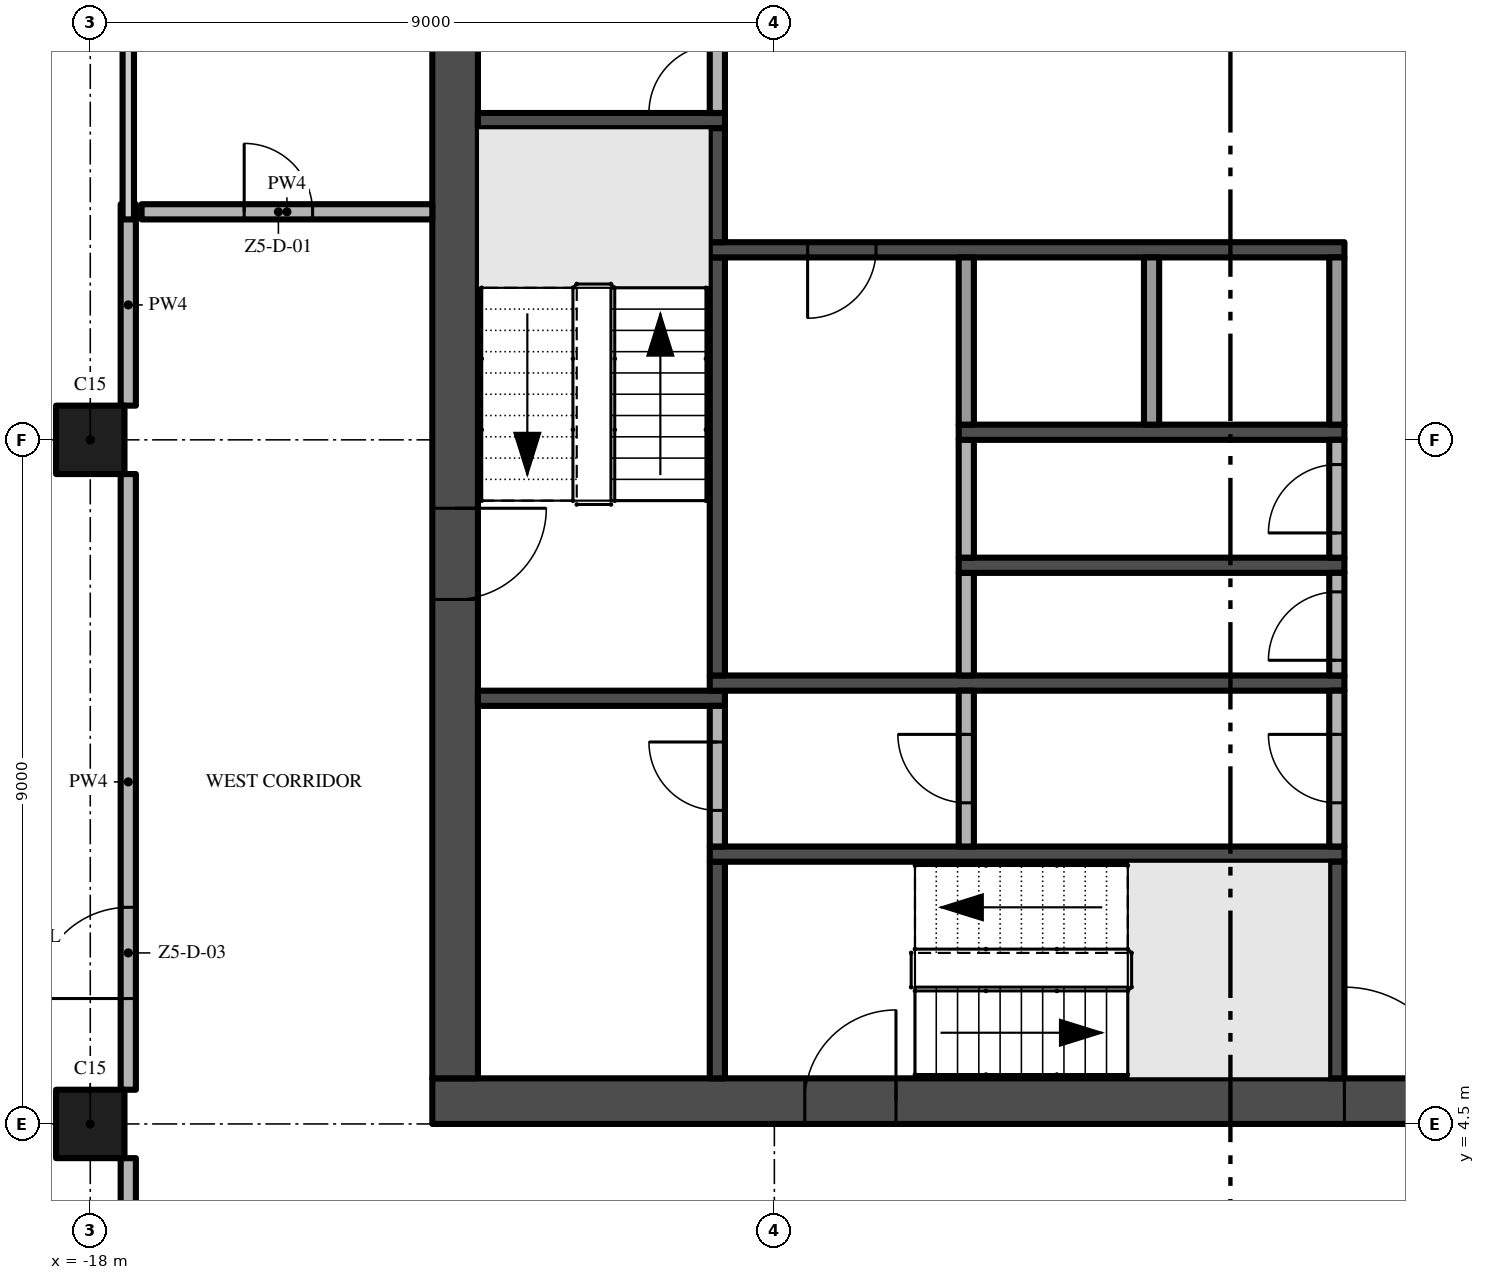
"""IFC4 building model, lengths in metres.
Left out: names, types, materials, properties, quantities, classifications, styles, units other than length and angle.
Written with IfcOpenShell. Run it as: python <this file> out.ifc"""

import sys

from ifc_helpers import new_model, si_unit, direction, frame, frame_2d, origin, origin_2d, place, context, subcontext, project, spatial, rectangle, extrude, element, fill, save


model = new_model("IFC4")
c1 = context("Model", 3, precision=1e-05, world=origin(), true_north=direction((0.0, 1.0)))
c2 = subcontext(c1, "Body", "Model", "MODEL_VIEW")
j1 = project(units=[si_unit("LENGTHUNIT", "METRE"), si_unit("PLANEANGLEUNIT", "RADIAN")], contexts=[c1])
p1 = place(None, origin())
s1 = spatial("IfcSite", under=j1, at=p1, CompositionType="ELEMENT")
p2 = place(p1, origin())
s2 = spatial("IfcBuilding", under=s1, at=p2, CompositionType="ELEMENT")
p3 = place(p2, frame((0.0, 0.0, 280.6)))
s3 = spatial("IfcBuildingStorey", under=s2, at=p3, CompositionType="ELEMENT", Elevation=280.6)
p4 = place(p3, frame((-13.5, 4.8, -0.3), z_axis=(0.0, 0.0, 1.0), x_axis=(1.0, 0.0, 0.0)))
e1 = element("IfcWall", 1, at=p4, inside=s3, PredefinedType="SHEAR", context=c2, shape_type="SweptSolid", body=[
    extrude(rectangle(XDim=27.0, YDim=0.6, at=frame_2d((13.5, 0.0))), origin(), (0.0, 0.0, 1.0), 3.8),
])
p5 = place(p4, frame((12.0, 0.0, 0.3)))
e2 = element("IfcOpeningElement", 2, at=p5, cuts=e1, PredefinedType="OPENING", context=c2, shape_type="SweptSolid", body=[
    extrude(rectangle(XDim=3.0, YDim=2.4, at=frame_2d((1.5, 1.2))), frame((0.0, 0.31, 0.0), z_axis=(0.0, -1.0, 0.0), x_axis=(1.0, 0.0, 0.0)), (0.0, 0.0, 1.0), 0.62),
])
p6 = place(p4, frame((4.9, 0.0, 0.3)))
e3 = element("IfcOpeningElement", 3, at=p6, cuts=e1, PredefinedType="OPENING", context=c2, shape_type="SweptSolid", body=[
    extrude(rectangle(XDim=1.2, YDim=2.2, at=frame_2d((0.6, 1.1))), frame((0.0, 0.31, 0.0), z_axis=(0.0, -1.0, 0.0), x_axis=(1.0, 0.0, 0.0)), (0.0, 0.0, 1.0), 0.62),
])
p7 = place(p4, frame((20.75, 0.0, 0.3)))
e4 = element("IfcOpeningElement", 4, at=p7, cuts=e1, PredefinedType="OPENING", context=c2, shape_type="SweptSolid", body=[
    extrude(rectangle(XDim=1.5, YDim=2.2, at=frame_2d((0.75, 1.1))), frame((0.0, 0.31, 0.0), z_axis=(0.0, -1.0, 0.0), x_axis=(1.0, 0.0, 0.0)), (0.0, 0.0, 1.0), 0.62),
])
p8 = place(p4, frame((17.4, 0.0, 0.3)))
e5 = element("IfcOpeningElement", 5, at=p8, cuts=e1, PredefinedType="OPENING", context=c2, shape_type="SweptSolid", body=[
    extrude(rectangle(XDim=1.2, YDim=2.2, at=frame_2d((0.6, 1.1))), frame((0.0, 0.31, 0.0), z_axis=(0.0, -1.0, 0.0), x_axis=(1.0, 0.0, 0.0)), (0.0, 0.0, 1.0), 0.62),
])
p9 = place(p3, frame((-13.2, 21.9, -0.3), z_axis=(0.0, 0.0, 1.0), x_axis=(0.0, -1.0, 0.0)))
e6 = element("IfcWall", 6, at=p9, inside=s3, PredefinedType="SHEAR", context=c2, shape_type="SweptSolid", body=[
    extrude(rectangle(XDim=16.8, YDim=0.6, at=frame_2d((8.4, 0.0))), origin(), (0.0, 0.0, 1.0), 3.8),
])
p10 = place(p9, frame((9.3, 0.0, 0.3)))
e7 = element("IfcOpeningElement", 7, at=p10, cuts=e6, PredefinedType="OPENING", context=c2, shape_type="SweptSolid", body=[
    extrude(rectangle(XDim=1.2, YDim=2.2, at=frame_2d((0.6, 1.1))), frame((0.0, 0.31, 0.0), z_axis=(0.0, -1.0, 0.0), x_axis=(1.0, 0.0, 0.0)), (0.0, 0.0, 1.0), 0.62),
])
for number, where, z_axis, x_axis in (
    (8, (-18.0, 13.5, 0.0), (0.0, 0.0, 1.0), (1.0, 0.0, 0.0)),
    (9, (-18.0, 4.5, 0.0), (0.0, 0.0, 1.0), (1.0, 0.0, 0.0)),
):
    element("IfcColumn", number, at=place(p3, frame(where, z_axis=z_axis, x_axis=x_axis)), inside=s3, PredefinedType="COLUMN", context=c2, shape_type="SweptSolid", body=[
        extrude(rectangle(XDim=0.9, YDim=0.9, at=origin_2d()), origin(), (0.0, 0.0, 1.0), 3.5),
    ])
for number, where, z_axis, x_axis in (
    (10, (-12.9, 10.1, 0.0), (0.0, 0.0, 1.0), (1.0, 0.0, 0.0)),
    (11, (-12.9, 17.7, 0.0), (0.0, 0.0, 1.0), (1.0, 0.0, 0.0)),
):
    element("IfcWall", number, at=place(p3, frame(where, z_axis=z_axis, x_axis=x_axis)), inside=s3, PredefinedType="SHEAR", context=c2, shape_type="SweptSolid", body=[
        extrude(rectangle(XDim=3.25, YDim=0.2, at=frame_2d((1.625, 0.0))), origin(), (0.0, 0.0, 1.0), 3.5),
    ])
p11 = place(p3, frame((-9.75, 5.1, 0.0), z_axis=(0.0, 0.0, 1.0), x_axis=(0.0, 1.0, 0.0)))
e12 = element("IfcWall", 12, at=p11, inside=s3, PredefinedType="SHEAR", context=c2, shape_type="SweptSolid", body=[
    extrude(rectangle(XDim=2.85, YDim=0.2, at=frame_2d((1.425, 0.0))), origin(), (0.0, 0.0, 1.0), 3.5),
])
p12 = place(p3, frame((-9.85, 8.05, 0.0), z_axis=(0.0, 0.0, 1.0), x_axis=(1.0, 0.0, 0.0)))
e13 = element("IfcWall", 13, at=p12, inside=s3, PredefinedType="SHEAR", context=c2, shape_type="SweptSolid", body=[
    extrude(rectangle(XDim=8.35, YDim=0.2, at=frame_2d((4.175, 0.0))), origin(), (0.0, 0.0, 1.0), 3.5),
])
p13 = place(p3, frame((-9.75, 8.15, 0.0), z_axis=(0.0, 0.0, 1.0), x_axis=(0.0, 1.0, 0.0)))
e14 = element("IfcWall", 14, at=p13, inside=s3, PredefinedType="PARTITIONING", context=c2, shape_type="SweptSolid", body=[
    extrude(rectangle(XDim=1.85, YDim=0.2, at=frame_2d((0.925, 0.0))), origin(), (0.0, 0.0, 1.0), 3.5),
])
p14 = place(p13, frame((0.475, 0.0, 0.0)))
e15 = element("IfcOpeningElement", 15, at=p14, cuts=e14, PredefinedType="OPENING", context=c2, shape_type="SweptSolid", body=[
    extrude(rectangle(XDim=0.9, YDim=2.1, at=frame_2d((0.45, 1.05))), frame((0.0, 0.11, 0.0), z_axis=(0.0, -1.0, 0.0), x_axis=(1.0, 0.0, 0.0)), (0.0, 0.0, 1.0), 0.22),
])
p15 = place(p3, frame((-9.85, 10.3, 0.0), z_axis=(0.0, 0.0, 1.0), x_axis=(1.0, 0.0, 0.0)))
e16 = element("IfcWall", 16, at=p15, inside=s3, PredefinedType="SHEAR", context=c2, shape_type="SweptSolid", body=[
    extrude(rectangle(XDim=8.35, YDim=0.2, at=frame_2d((4.175, 0.0))), origin(), (0.0, 0.0, 1.0), 3.5),
])
p16 = place(p3, frame((-9.75, 10.4, 0.0), z_axis=(0.0, 0.0, 1.0), x_axis=(0.0, 1.0, 0.0)))
e17 = element("IfcWall", 17, at=p16, inside=s3, PredefinedType="SHEAR", context=c2, shape_type="SweptSolid", body=[
    extrude(rectangle(XDim=5.5, YDim=0.2, at=frame_2d((2.75, 0.0))), origin(), (0.0, 0.0, 1.0), 3.5),
])
p17 = place(p3, frame((-1.5, 16.0, 0.0), z_axis=(0.0, 0.0, 1.0), x_axis=(-1.0, 0.0, 0.0)))
e18 = element("IfcWall", 18, at=p17, inside=s3, PredefinedType="SHEAR", context=c2, shape_type="SweptSolid", body=[
    extrude(rectangle(XDim=8.35, YDim=0.2, at=frame_2d((4.175, 0.0))), origin(), (0.0, 0.0, 1.0), 3.5),
])
p18 = place(p17, frame((6.162, 0.0, 0.0)))
e19 = element("IfcOpeningElement", 19, at=p18, cuts=e18, PredefinedType="OPENING", context=c2, shape_type="SweptSolid", body=[
    extrude(rectangle(XDim=0.9, YDim=2.1, at=frame_2d((0.45, 1.05))), frame((0.0, 0.11, 0.0), z_axis=(0.0, -1.0, 0.0), x_axis=(1.0, 0.0, 0.0)), (0.0, 0.0, 1.0), 0.22),
])
p19 = place(p3, frame((-9.75, 16.1, 0.0), z_axis=(0.0, 0.0, 1.0), x_axis=(0.0, 1.0, 0.0)))
e20 = element("IfcWall", 20, at=p19, inside=s3, PredefinedType="SHEAR", context=c2, shape_type="SweptSolid", body=[
    extrude(rectangle(XDim=1.5, YDim=0.2, at=frame_2d((0.75, 0.0))), origin(), (0.0, 0.0, 1.0), 3.5),
])
p20 = place(p3, frame((-9.75, 17.8, 0.0), z_axis=(0.0, 0.0, 1.0), x_axis=(0.0, 1.0, 0.0)))
e21 = element("IfcWall", 21, at=p20, inside=s3, PredefinedType="PARTITIONING", context=c2, shape_type="SweptSolid", body=[
    extrude(rectangle(XDim=1.4, YDim=0.2, at=frame_2d((0.7, 0.0))), origin(), (0.0, 0.0, 1.0), 3.5),
])
p21 = place(p20, origin())
e22 = element("IfcOpeningElement", 22, at=p21, cuts=e21, PredefinedType="OPENING", context=c2, shape_type="SweptSolid", body=[
    extrude(rectangle(XDim=0.9, YDim=2.1, at=frame_2d((0.45, 1.05))), frame((0.0, 0.11, 0.0), z_axis=(0.0, -1.0, 0.0), x_axis=(1.0, 0.0, 0.0)), (0.0, 0.0, 1.0), 0.22),
])
p22 = place(p3, frame((-6.475, 8.15, 0.0), z_axis=(0.0, 0.0, 1.0), x_axis=(0.0, 1.0, 0.0)))
e23 = element("IfcWall", 23, at=p22, inside=s3, PredefinedType="PARTITIONING", context=c2, shape_type="SweptSolid", body=[
    extrude(rectangle(XDim=2.05, YDim=0.2, at=frame_2d((1.025, 0.0))), origin(), (0.0, 0.0, 1.0), 3.5),
])
p23 = place(p22, frame((0.575, 0.0, 0.0)))
e24 = element("IfcOpeningElement", 24, at=p23, cuts=e23, PredefinedType="OPENING", context=c2, shape_type="SweptSolid", body=[
    extrude(rectangle(XDim=0.9, YDim=2.1, at=frame_2d((0.45, 1.05))), frame((0.0, 0.11, 0.0), z_axis=(0.0, -1.0, 0.0), x_axis=(1.0, 0.0, 0.0)), (0.0, 0.0, 1.0), 0.22),
])
p24 = place(p3, frame((-6.475, 10.4, 0.0), z_axis=(0.0, 0.0, 1.0), x_axis=(0.0, 1.0, 0.0)))
e25 = element("IfcWall", 25, at=p24, inside=s3, PredefinedType="PARTITIONING", context=c2, shape_type="SweptSolid", body=[
    extrude(rectangle(XDim=1.35, YDim=0.2, at=frame_2d((0.675, 0.0))), origin(), (0.0, 0.0, 1.0), 3.5),
])
p25 = place(p3, frame((-6.575, 11.85, 0.0), z_axis=(0.0, 0.0, 1.0), x_axis=(1.0, 0.0, 0.0)))
e26 = element("IfcWall", 26, at=p25, inside=s3, PredefinedType="SHEAR", context=c2, shape_type="SweptSolid", body=[
    extrude(rectangle(XDim=5.075, YDim=0.2, at=frame_2d((2.538, 0.0))), origin(), (0.0, 0.0, 1.0), 3.5),
])
p26 = place(p3, frame((-6.475, 11.95, 0.0), z_axis=(0.0, 0.0, 1.0), x_axis=(0.0, 1.0, 0.0)))
e27 = element("IfcWall", 27, at=p26, inside=s3, PredefinedType="PARTITIONING", context=c2, shape_type="SweptSolid", body=[
    extrude(rectangle(XDim=1.55, YDim=0.2, at=frame_2d((0.775, 0.0))), origin(), (0.0, 0.0, 1.0), 3.5),
])
p27 = place(p3, frame((-6.575, 13.6, 0.0), z_axis=(0.0, 0.0, 1.0), x_axis=(1.0, 0.0, 0.0)))
e28 = element("IfcWall", 28, at=p27, inside=s3, PredefinedType="SHEAR", context=c2, shape_type="SweptSolid", body=[
    extrude(rectangle(XDim=5.075, YDim=0.2, at=frame_2d((2.538, 0.0))), origin(), (0.0, 0.0, 1.0), 3.5),
])
for number, where, z_axis, x_axis in (
    (29, (-6.475, 13.7, 0.0), (0.0, 0.0, 1.0), (0.0, 1.0, 0.0)),
    (30, (-4.037, 13.7, 0.0), (0.0, 0.0, 1.0), (0.0, 1.0, 0.0)),
):
    element("IfcWall", number, at=place(p3, frame(where, z_axis=z_axis, x_axis=x_axis)), inside=s3, PredefinedType="PARTITIONING", context=c2, shape_type="SweptSolid", body=[
        extrude(rectangle(XDim=2.2, YDim=0.2, at=frame_2d((1.1, 0.0))), origin(), (0.0, 0.0, 1.0), 3.5),
    ])
p28 = place(p3, frame((-1.6, 5.1, 0.0), z_axis=(0.0, 0.0, 1.0), x_axis=(0.0, 1.0, 0.0)))
e31 = element("IfcWall", 31, at=p28, inside=s3, PredefinedType="SHEAR", context=c2, shape_type="SweptSolid", body=[
    extrude(rectangle(XDim=2.85, YDim=0.2, at=frame_2d((1.425, 0.0))), origin(), (0.0, 0.0, 1.0), 3.5),
])
p29 = place(p3, frame((-1.6, 8.15, 0.0), z_axis=(0.0, 0.0, 1.0), x_axis=(0.0, 1.0, 0.0)))
e32 = element("IfcWall", 32, at=p29, inside=s3, PredefinedType="PARTITIONING", context=c2, shape_type="SweptSolid", body=[
    extrude(rectangle(XDim=2.05, YDim=0.2, at=frame_2d((1.025, 0.0))), origin(), (0.0, 0.0, 1.0), 3.5),
])
p30 = place(p29, frame((0.575, 0.0, 0.0)))
e33 = element("IfcOpeningElement", 33, at=p30, cuts=e32, PredefinedType="OPENING", context=c2, shape_type="SweptSolid", body=[
    extrude(rectangle(XDim=0.9, YDim=2.1, at=frame_2d((0.45, 1.05))), frame((0.0, 0.11, 0.0), z_axis=(0.0, -1.0, 0.0), x_axis=(1.0, 0.0, 0.0)), (0.0, 0.0, 1.0), 0.22),
])
p31 = place(p3, frame((-1.6, 10.4, 0.0), z_axis=(0.0, 0.0, 1.0), x_axis=(0.0, 1.0, 0.0)))
e34 = element("IfcWall", 34, at=p31, inside=s3, PredefinedType="PARTITIONING", context=c2, shape_type="SweptSolid", body=[
    extrude(rectangle(XDim=1.35, YDim=0.2, at=frame_2d((0.675, 0.0))), origin(), (0.0, 0.0, 1.0), 3.5),
])
p32 = place(p31, frame((0.2, 0.0, 0.0)))
e35 = element("IfcOpeningElement", 35, at=p32, cuts=e34, PredefinedType="OPENING", context=c2, shape_type="SweptSolid", body=[
    extrude(rectangle(XDim=0.9, YDim=2.1, at=frame_2d((0.45, 1.05))), frame((0.0, 0.11, 0.0), z_axis=(0.0, -1.0, 0.0), x_axis=(1.0, 0.0, 0.0)), (0.0, 0.0, 1.0), 0.22),
])
p33 = place(p3, frame((-1.6, 11.95, 0.0), z_axis=(0.0, 0.0, 1.0), x_axis=(0.0, 1.0, 0.0)))
e36 = element("IfcWall", 36, at=p33, inside=s3, PredefinedType="PARTITIONING", context=c2, shape_type="SweptSolid", body=[
    extrude(rectangle(XDim=1.55, YDim=0.2, at=frame_2d((0.775, 0.0))), origin(), (0.0, 0.0, 1.0), 3.5),
])
p34 = place(p33, frame((0.325, 0.0, 0.0)))
e37 = element("IfcOpeningElement", 37, at=p34, cuts=e36, PredefinedType="OPENING", context=c2, shape_type="SweptSolid", body=[
    extrude(rectangle(XDim=0.9, YDim=2.1, at=frame_2d((0.45, 1.05))), frame((0.0, 0.11, 0.0), z_axis=(0.0, -1.0, 0.0), x_axis=(1.0, 0.0, 0.0)), (0.0, 0.0, 1.0), 0.22),
])
p35 = place(p3, frame((-1.6, 13.7, 0.0), z_axis=(0.0, 0.0, 1.0), x_axis=(0.0, 1.0, 0.0)))
e38 = element("IfcWall", 38, at=p35, inside=s3, PredefinedType="PARTITIONING", context=c2, shape_type="SweptSolid", body=[
    extrude(rectangle(XDim=2.2, YDim=0.2, at=frame_2d((1.1, 0.0))), origin(), (0.0, 0.0, 1.0), 3.5),
])
p36 = place(p3, frame((-17.325, 16.5, 0.0), z_axis=(0.0, 0.0, 1.0), x_axis=(1.0, 0.0, 0.0)))
e39 = element("IfcWall", 39, at=p36, inside=s3, PredefinedType="PARTITIONING", context=c2, shape_type="SweptSolid", body=[
    extrude(rectangle(XDim=3.825, YDim=0.2, at=frame_2d((1.913, 0.0))), origin(), (0.0, 0.0, 1.0), 3.5),
])
p37 = place(p36, frame((1.35, 0.0, 0.0)))
e40 = element("IfcOpeningElement", 40, at=p37, cuts=e39, PredefinedType="OPENING", context=c2, shape_type="SweptSolid", body=[
    extrude(rectangle(XDim=0.9, YDim=2.1, at=frame_2d((0.45, 1.05))), frame((0.0, 0.11, 0.0), z_axis=(0.0, -1.0, 0.0), x_axis=(1.0, 0.0, 0.0)), (0.0, 0.0, 1.0), 0.22),
])
p38 = place(p3, frame((-17.5, -0.2, 0.0), z_axis=(0.0, 0.0, 1.0), x_axis=(0.0, 1.0, 0.0)))
e41 = element("IfcWall", 41, at=p38, inside=s3, PredefinedType="PARTITIONING", context=c2, shape_type="SweptSolid", body=[
    extrude(rectangle(XDim=4.25, YDim=0.2, at=frame_2d((2.125, 0.0))), origin(), (0.0, 0.0, 1.0), 3.5),
])
p39 = place(p3, frame((-17.5, 4.95, 0.0), z_axis=(0.0, 0.0, 1.0), x_axis=(0.0, 1.0, 0.0)))
e42 = element("IfcWall", 42, at=p39, inside=s3, PredefinedType="PARTITIONING", context=c2, shape_type="SweptSolid", body=[
    extrude(rectangle(XDim=8.1, YDim=0.2, at=frame_2d((4.05, 0.0))), origin(), (0.0, 0.0, 1.0), 3.5),
])
p40 = place(p39, frame((1.2, 0.0, 0.0)))
e43 = element("IfcOpeningElement", 43, at=p40, cuts=e42, PredefinedType="OPENING", context=c2, shape_type="SweptSolid", body=[
    extrude(rectangle(XDim=1.2, YDim=2.4, at=frame_2d((0.6, 1.2))), frame((0.0, 0.11, 0.0), z_axis=(0.0, -1.0, 0.0), x_axis=(1.0, 0.0, 0.0)), (0.0, 0.0, 1.0), 0.22),
])
p41 = place(p3, frame((-17.5, 13.95, 0.0), z_axis=(0.0, 0.0, 1.0), x_axis=(0.0, 1.0, 0.0)))
e44 = element("IfcWall", 44, at=p41, inside=s3, PredefinedType="PARTITIONING", context=c2, shape_type="SweptSolid", body=[
    extrude(rectangle(XDim=2.65, YDim=0.2, at=frame_2d((1.325, 0.0))), origin(), (0.0, 0.0, 1.0), 3.5),
])
p42 = place(p3, frame((-17.5, 16.4, 0.0), z_axis=(0.0, 0.0, 1.0), x_axis=(0.0, 1.0, 0.0)))
e45 = element("IfcWall", 45, at=p42, inside=s3, PredefinedType="PARTITIONING", context=c2, shape_type="SweptSolid", body=[
    extrude(rectangle(XDim=5.2, YDim=0.15, at=frame_2d((2.6, 0.0))), origin(), (0.0, 0.0, 1.0), 3.5),
])
p43 = place(p5, frame((3.0, 0.0, 0.0), z_axis=(0.0, 0.0, 1.0), x_axis=(-1.0, 0.0, 0.0)))
e46 = element("IfcDoor", 46, at=p43, inside=s3, OperationType="DOUBLE_DOOR_SINGLE_SWING", PredefinedType="DOOR", context=c2, shape_type="SweptSolid", body=[
    extrude(rectangle(XDim=3.0, YDim=2.4, at=frame_2d((1.5, 1.2))), frame((0.0, 0.025, 0.0), z_axis=(0.0, -1.0, 0.0), x_axis=(1.0, 0.0, 0.0)), (0.0, 0.0, 1.0), 0.05),
])
fill(e2, e46)
p44 = place(p10, frame((1.2, 0.0, 0.0), z_axis=(0.0, 0.0, 1.0), x_axis=(-1.0, 0.0, 0.0)))
e47 = element("IfcDoor", 47, at=p44, inside=s3, OperationType="SINGLE_SWING_RIGHT", PredefinedType="DOOR", context=c2, shape_type="SweptSolid", body=[
    extrude(rectangle(XDim=1.2, YDim=2.2, at=frame_2d((0.6, 1.1))), frame((0.0, 0.025, 0.0), z_axis=(0.0, -1.0, 0.0), x_axis=(1.0, 0.0, 0.0)), (0.0, 0.0, 1.0), 0.05),
])
fill(e7, e47)
p45 = place(p6, frame((1.2, 0.0, 0.0), z_axis=(0.0, 0.0, 1.0), x_axis=(-1.0, 0.0, 0.0)))
e48 = element("IfcDoor", 48, at=p45, inside=s3, OperationType="SINGLE_SWING_LEFT", PredefinedType="DOOR", context=c2, shape_type="SweptSolid", body=[
    extrude(rectangle(XDim=1.2, YDim=2.2, at=frame_2d((0.6, 1.1))), frame((0.0, 0.025, 0.0), z_axis=(0.0, -1.0, 0.0), x_axis=(1.0, 0.0, 0.0)), (0.0, 0.0, 1.0), 0.05),
])
fill(e3, e48)
p46 = place(p18, origin())
e49 = element("IfcDoor", 49, at=p46, inside=s3, OperationType="SINGLE_SWING_RIGHT", PredefinedType="DOOR", context=c2, shape_type="SweptSolid", body=[
    extrude(rectangle(XDim=0.9, YDim=2.1, at=frame_2d((0.45, 1.05))), frame((0.0, 0.025, 0.0), z_axis=(0.0, -1.0, 0.0), x_axis=(1.0, 0.0, 0.0)), (0.0, 0.0, 1.0), 0.05),
])
fill(e19, e49)
p47 = place(p30, origin())
e50 = element("IfcDoor", 50, at=p47, inside=s3, OperationType="SINGLE_SWING_RIGHT", PredefinedType="DOOR", context=c2, shape_type="SweptSolid", body=[
    extrude(rectangle(XDim=0.9, YDim=2.1, at=frame_2d((0.45, 1.05))), frame((0.0, 0.025, 0.0), z_axis=(0.0, -1.0, 0.0), x_axis=(1.0, 0.0, 0.0)), (0.0, 0.0, 1.0), 0.05),
])
fill(e33, e50)
p48 = place(p32, origin())
e51 = element("IfcDoor", 51, at=p48, inside=s3, OperationType="SINGLE_SWING_LEFT", PredefinedType="DOOR", context=c2, shape_type="SweptSolid", body=[
    extrude(rectangle(XDim=0.9, YDim=2.1, at=frame_2d((0.45, 1.05))), frame((0.0, 0.025, 0.0), z_axis=(0.0, -1.0, 0.0), x_axis=(1.0, 0.0, 0.0)), (0.0, 0.0, 1.0), 0.05),
])
fill(e35, e51)
p49 = place(p34, origin())
e52 = element("IfcDoor", 52, at=p49, inside=s3, OperationType="SINGLE_SWING_LEFT", PredefinedType="DOOR", context=c2, shape_type="SweptSolid", body=[
    extrude(rectangle(XDim=0.9, YDim=2.1, at=frame_2d((0.45, 1.05))), frame((0.0, 0.025, 0.0), z_axis=(0.0, -1.0, 0.0), x_axis=(1.0, 0.0, 0.0)), (0.0, 0.0, 1.0), 0.05),
])
fill(e37, e52)
p50 = place(p21, origin())
e53 = element("IfcDoor", 53, at=p50, inside=s3, OperationType="SINGLE_SWING_LEFT", PredefinedType="DOOR", context=c2, shape_type="SweptSolid", body=[
    extrude(rectangle(XDim=0.9, YDim=2.1, at=frame_2d((0.45, 1.05))), frame((0.0, 0.025, 0.0), z_axis=(0.0, -1.0, 0.0), x_axis=(1.0, 0.0, 0.0)), (0.0, 0.0, 1.0), 0.05),
])
fill(e22, e53)
p51 = place(p23, origin())
e54 = element("IfcDoor", 54, at=p51, inside=s3, OperationType="SINGLE_SWING_RIGHT", PredefinedType="DOOR", context=c2, shape_type="SweptSolid", body=[
    extrude(rectangle(XDim=0.9, YDim=2.1, at=frame_2d((0.45, 1.05))), frame((0.0, 0.025, 0.0), z_axis=(0.0, -1.0, 0.0), x_axis=(1.0, 0.0, 0.0)), (0.0, 0.0, 1.0), 0.05),
])
fill(e24, e54)
p52 = place(p14, origin())
e55 = element("IfcDoor", 55, at=p52, inside=s3, OperationType="SINGLE_SWING_RIGHT", PredefinedType="DOOR", context=c2, shape_type="SweptSolid", body=[
    extrude(rectangle(XDim=0.9, YDim=2.1, at=frame_2d((0.45, 1.05))), frame((0.0, 0.025, 0.0), z_axis=(0.0, -1.0, 0.0), x_axis=(1.0, 0.0, 0.0)), (0.0, 0.0, 1.0), 0.05),
])
fill(e15, e55)
p53 = place(p37, origin())
e56 = element("IfcDoor", 56, at=p53, inside=s3, OperationType="SINGLE_SWING_LEFT", PredefinedType="DOOR", context=c2, shape_type="SweptSolid", body=[
    extrude(rectangle(XDim=0.9, YDim=2.1, at=frame_2d((0.45, 1.05))), frame((0.0, 0.025, 0.0), z_axis=(0.0, -1.0, 0.0), x_axis=(1.0, 0.0, 0.0)), (0.0, 0.0, 1.0), 0.05),
])
fill(e40, e56)
p54 = place(p40, origin())
e57 = element("IfcDoor", 57, at=p54, inside=s3, OperationType="SINGLE_SWING_LEFT", PredefinedType="DOOR", context=c2, shape_type="SweptSolid", body=[
    extrude(rectangle(XDim=1.2, YDim=2.4, at=frame_2d((0.6, 1.2))), frame((0.0, 0.025, 0.0), z_axis=(0.0, -1.0, 0.0), x_axis=(1.0, 0.0, 0.0)), (0.0, 0.0, 1.0), 0.05),
])
fill(e43, e57)
save(model, sys.argv[1])
